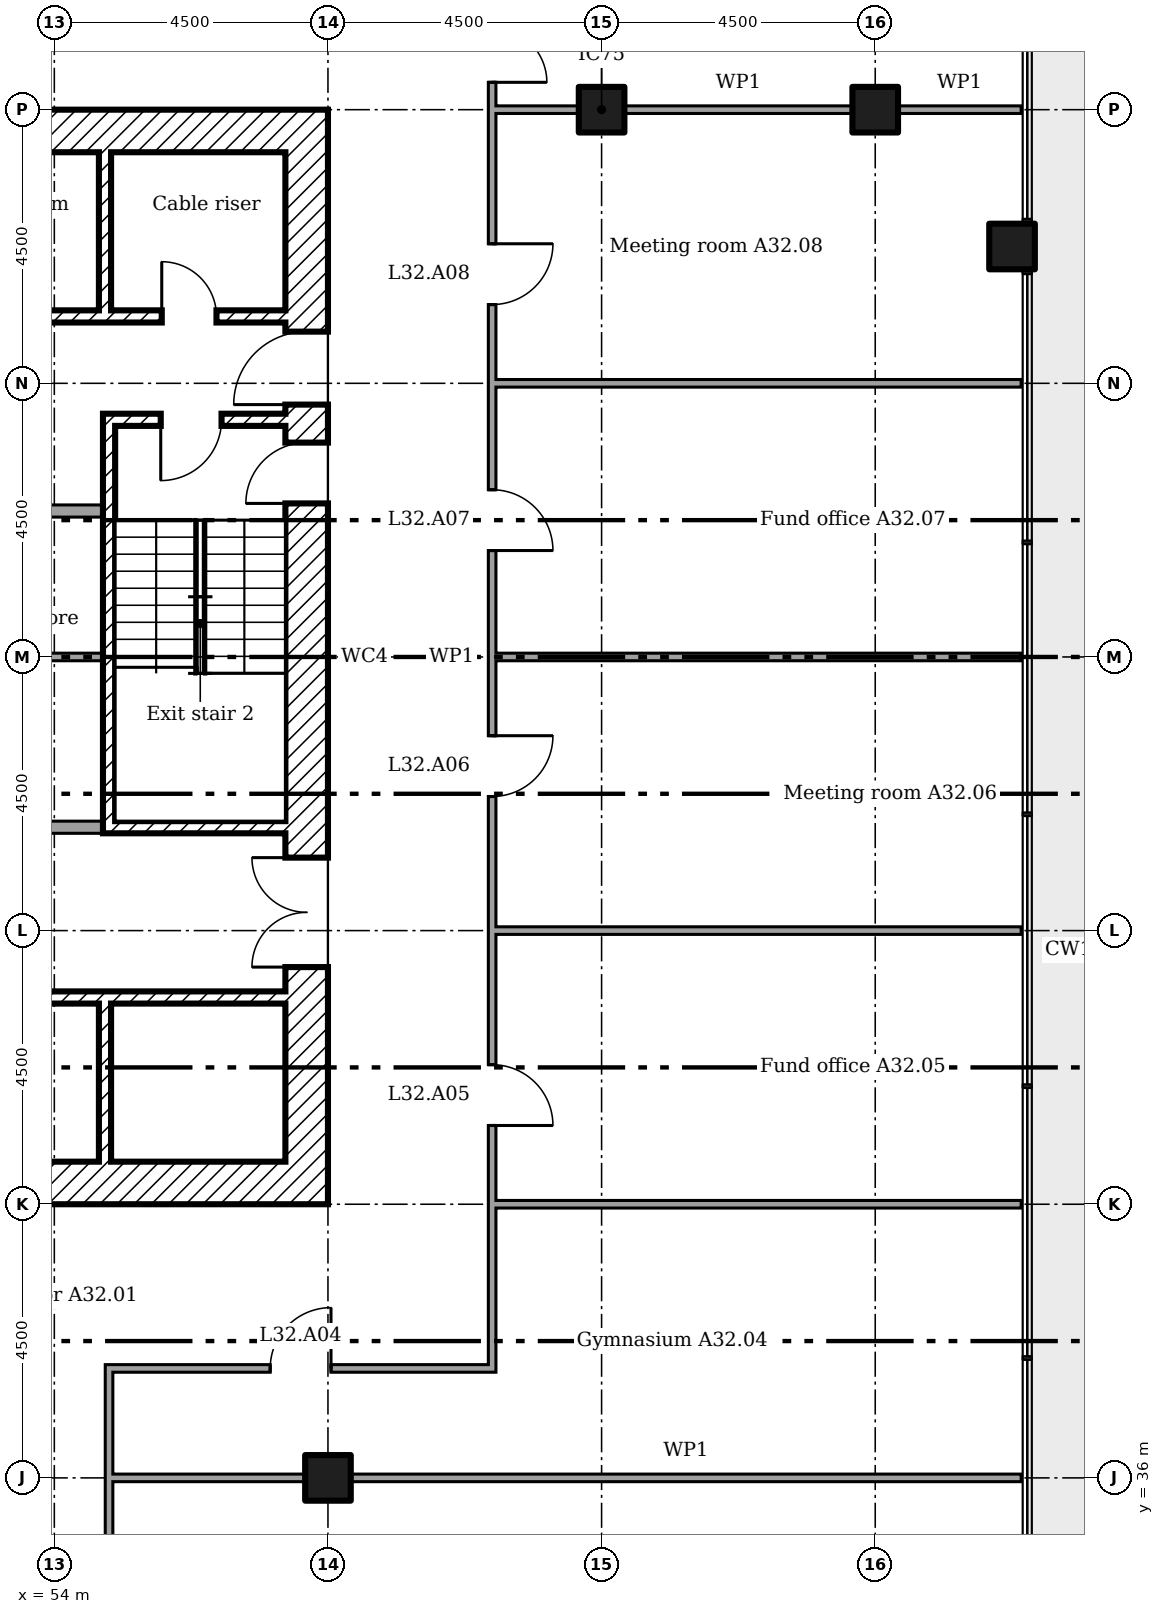
"""IFC4 building model, lengths in metres.
Left out: names, types, materials, properties, quantities, classifications, styles, units other than length and angle.
Written with IfcOpenShell. Run it as: python <this file> out.ifc"""

import sys

from ifc_helpers import new_model, si_unit, direction, frame, frame_2d, origin, origin_2d, place, context, subcontext, project, spatial, rectangle, extrude, element, fill, save


model = new_model("IFC4")
c1 = context("Model", 3, precision=1e-05, world=origin(), true_north=direction((0.0, 1.0)))
c2 = subcontext(c1, "Body", "Model", "MODEL_VIEW")
j1 = project(units=[si_unit("LENGTHUNIT", "METRE"), si_unit("PLANEANGLEUNIT", "RADIAN")], contexts=[c1])
p1 = place(None, origin())
s1 = spatial("IfcSite", under=j1, at=p1, CompositionType="ELEMENT")
p2 = place(p1, origin())
s2 = spatial("IfcBuilding", under=s1, at=p2, CompositionType="ELEMENT")
p3 = place(p2, frame((0.0, 0.0, 131.6)))
s3 = spatial("IfcBuildingStorey", under=s2, at=p3, CompositionType="ELEMENT", Elevation=131.6)
for number, where in (
    (1, (58.5, 36.0, 0.0)),
    (2, (63.0, 58.5, 0.0)),
    (3, (67.5, 58.5, 0.0)),
    (4, (69.75, 56.25, 0.0)),
):
    element("IfcColumn", number, at=place(p3, frame(where)), inside=s3, PredefinedType="COLUMN", context=c2, shape_type="SweptSolid", body=[
        extrude(rectangle(XDim=0.75, YDim=0.75, at=origin_2d()), origin(), (0.0, 0.0, 1.0), 3.6),
    ])
p4 = place(p3, frame((58.15, 40.5, 0.0), z_axis=(0.0, 0.0, 1.0), x_axis=(0.0, 1.0, 0.0)))
e5 = element("IfcWall", 5, at=p4, inside=s3, PredefinedType="SHEAR", context=c2, shape_type="SweptSolid", body=[
    extrude(rectangle(XDim=18.0, YDim=0.7, at=frame_2d((9.0, 0.0))), origin(), (0.0, 0.0, 1.0), 3.35),
])
p5 = place(p4, frame((13.15, 0.0, 0.0)))
e6 = element("IfcOpeningElement", 6, at=p5, cuts=e5, PredefinedType="OPENING", context=c2, shape_type="SweptSolid", body=[
    extrude(rectangle(XDim=1.2, YDim=2.1, at=frame_2d((0.6, 1.05))), frame((0.0, 0.36, 0.0), z_axis=(0.0, -1.0, 0.0), x_axis=(1.0, 0.0, 0.0)), (0.0, 0.0, 1.0), 0.72),
])
p6 = place(p4, frame((3.9, 0.0, 0.0)))
e7 = element("IfcOpeningElement", 7, at=p6, cuts=e5, PredefinedType="OPENING", context=c2, shape_type="SweptSolid", body=[
    extrude(rectangle(XDim=1.8, YDim=2.1, at=frame_2d((0.9, 1.05))), frame((0.0, 0.36, 0.0), z_axis=(0.0, -1.0, 0.0), x_axis=(1.0, 0.0, 0.0)), (0.0, 0.0, 1.0), 0.72),
])
p7 = place(p4, frame((11.525, 0.0, 0.0)))
e8 = element("IfcOpeningElement", 8, at=p7, cuts=e5, PredefinedType="OPENING", context=c2, shape_type="SweptSolid", body=[
    extrude(rectangle(XDim=1.0, YDim=2.1, at=frame_2d((0.5, 1.05))), frame((0.0, 0.36, 0.0), z_axis=(0.0, -1.0, 0.0), x_axis=(1.0, 0.0, 0.0)), (0.0, 0.0, 1.0), 0.72),
])
for number, where in (
    (9, (41.2, 58.15, 0.0)),
    (10, (41.2, 40.85, 0.0)),
):
    element("IfcWall", number, at=place(p3, frame(where)), inside=s3, PredefinedType="SHEAR", context=c2, shape_type="SweptSolid", body=[
        extrude(rectangle(XDim=16.6, YDim=0.7, at=frame_2d((8.3, 0.0))), origin(), (0.0, 0.0, 1.0), 3.35),
    ])
for number, where, z_axis, x_axis in (
    (11, (54.833, 57.8, 0.0), (0.0, 0.0, 1.0), (0.0, -1.0, 0.0)),
    (12, (54.833, 41.2, 0.0), (0.0, 0.0, 1.0), (0.0, 1.0, 0.0)),
):
    element("IfcWall", number, at=place(p3, frame(where, z_axis=z_axis, x_axis=x_axis)), inside=s3, PredefinedType="SHEAR", context=c2, shape_type="SweptSolid", body=[
        extrude(rectangle(XDim=2.6, YDim=0.2, at=frame_2d((1.3, 0.0))), origin(), (0.0, 0.0, 1.0), 3.35),
    ])
p8 = place(p3, frame((46.933, 55.1, 0.0)))
e13 = element("IfcWall", 13, at=p8, inside=s3, PredefinedType="SHEAR", context=c2, shape_type="SweptSolid", body=[
    extrude(rectangle(XDim=10.867, YDim=0.2, at=frame_2d((5.433, 0.0))), origin(), (0.0, 0.0, 1.0), 3.35),
])
p9 = place(p8, frame((8.833, 0.0, 0.0)))
e14 = element("IfcOpeningElement", 14, at=p9, cuts=e13, PredefinedType="OPENING", context=c2, shape_type="SweptSolid", body=[
    extrude(rectangle(XDim=0.9, YDim=2.1, at=frame_2d((0.45, 1.05))), frame((0.0, 0.11, 0.0), z_axis=(0.0, -1.0, 0.0), x_axis=(1.0, 0.0, 0.0)), (0.0, 0.0, 1.0), 0.22),
])
p10 = place(p8, frame((0.783, 0.0, 0.0)))
e15 = element("IfcOpeningElement", 15, at=p10, cuts=e13, PredefinedType="OPENING", context=c2, shape_type="SweptSolid", body=[
    extrude(rectangle(XDim=0.9, YDim=2.1, at=frame_2d((0.45, 1.05))), frame((0.0, 0.11, 0.0), z_axis=(0.0, -1.0, 0.0), x_axis=(1.0, 0.0, 0.0)), (0.0, 0.0, 1.0), 0.22),
])
p11 = place(p8, frame((4.783, 0.0, 0.0)))
e16 = element("IfcOpeningElement", 16, at=p11, cuts=e13, PredefinedType="OPENING", context=c2, shape_type="SweptSolid", body=[
    extrude(rectangle(XDim=0.9, YDim=2.1, at=frame_2d((0.45, 1.05))), frame((0.0, 0.11, 0.0), z_axis=(0.0, -1.0, 0.0), x_axis=(1.0, 0.0, 0.0)), (0.0, 0.0, 1.0), 0.22),
])
p12 = place(p3, frame((41.2, 43.9, 0.0)))
e17 = element("IfcWall", 17, at=p12, inside=s3, PredefinedType="SHEAR", context=c2, shape_type="SweptSolid", body=[
    extrude(rectangle(XDim=16.6, YDim=0.2, at=frame_2d((8.3, 0.0))), origin(), (0.0, 0.0, 1.0), 3.35),
])
p13 = place(p12, frame((1.033, 0.0, 0.0)))
e18 = element("IfcOpeningElement", 18, at=p13, cuts=e17, PredefinedType="OPENING", context=c2, shape_type="SweptSolid", body=[
    extrude(rectangle(XDim=1.2, YDim=2.1, at=frame_2d((0.6, 1.05))), frame((0.0, 0.11, 0.0), z_axis=(0.0, -1.0, 0.0), x_axis=(1.0, 0.0, 0.0)), (0.0, 0.0, 1.0), 0.22),
])
p14 = place(p12, frame((3.7, 0.0, 0.0)))
e19 = element("IfcOpeningElement", 19, at=p14, cuts=e17, PredefinedType="OPENING", context=c2, shape_type="SweptSolid", body=[
    extrude(rectangle(XDim=1.2, YDim=2.1, at=frame_2d((0.6, 1.05))), frame((0.0, 0.11, 0.0), z_axis=(0.0, -1.0, 0.0), x_axis=(1.0, 0.0, 0.0)), (0.0, 0.0, 1.0), 0.22),
])
p15 = place(p12, frame((6.367, 0.0, 0.0)))
e20 = element("IfcOpeningElement", 20, at=p15, cuts=e17, PredefinedType="OPENING", context=c2, shape_type="SweptSolid", body=[
    extrude(rectangle(XDim=1.2, YDim=2.1, at=frame_2d((0.6, 1.05))), frame((0.0, 0.11, 0.0), z_axis=(0.0, -1.0, 0.0), x_axis=(1.0, 0.0, 0.0)), (0.0, 0.0, 1.0), 0.22),
])
p16 = place(p12, frame((9.033, 0.0, 0.0)))
e21 = element("IfcOpeningElement", 21, at=p16, cuts=e17, PredefinedType="OPENING", context=c2, shape_type="SweptSolid", body=[
    extrude(rectangle(XDim=1.2, YDim=2.1, at=frame_2d((0.6, 1.05))), frame((0.0, 0.11, 0.0), z_axis=(0.0, -1.0, 0.0), x_axis=(1.0, 0.0, 0.0)), (0.0, 0.0, 1.0), 0.22),
])
p17 = place(p3, frame((54.8, 53.4, 0.0)))
e22 = element("IfcWall", 22, at=p17, inside=s3, PredefinedType="SHEAR", context=c2, shape_type="SweptSolid", body=[
    extrude(rectangle(XDim=3.0, YDim=0.2, at=frame_2d((1.5, 0.0))), origin(), (0.0, 0.0, 1.0), 3.35),
])
p18 = place(p17, frame((0.95, 0.0, 0.0)))
e23 = element("IfcOpeningElement", 23, at=p18, cuts=e22, PredefinedType="OPENING", context=c2, shape_type="SweptSolid", body=[
    extrude(rectangle(XDim=1.0, YDim=2.1, at=frame_2d((0.5, 1.05))), frame((0.0, 0.11, 0.0), z_axis=(0.0, -1.0, 0.0), x_axis=(1.0, 0.0, 0.0)), (0.0, 0.0, 1.0), 0.22),
])
p19 = place(p3, frame((54.8, 46.7, 0.0)))
e24 = element("IfcWall", 24, at=p19, inside=s3, PredefinedType="SHEAR", context=c2, shape_type="SweptSolid", body=[
    extrude(rectangle(XDim=3.0, YDim=0.2, at=frame_2d((1.5, 0.0))), origin(), (0.0, 0.0, 1.0), 3.35),
])
p20 = place(p3, frame((54.9, 46.8, 0.0), z_axis=(0.0, 0.0, 1.0), x_axis=(0.0, 1.0, 0.0)))
e25 = element("IfcWall", 25, at=p20, inside=s3, PredefinedType="SHEAR", context=c2, shape_type="SweptSolid", body=[
    extrude(rectangle(XDim=6.5, YDim=0.2, at=frame_2d((3.25, 0.0))), origin(), (0.0, 0.0, 1.0), 3.35),
])
p21 = place(p3, frame((44.2, 51.9, 0.0)))
e26 = element("IfcWall", 26, at=p21, inside=s3, PredefinedType="PARTITIONING", context=c2, shape_type="SweptSolid", body=[
    extrude(rectangle(XDim=10.6, YDim=0.2, at=frame_2d((5.3, 0.0))), origin(), (0.0, 0.0, 1.0), 3.35),
])
p22 = place(p21, frame((8.5, 0.0, 0.0)))
e27 = element("IfcOpeningElement", 27, at=p22, cuts=e26, PredefinedType="OPENING", context=c2, shape_type="SweptSolid", body=[
    extrude(rectangle(XDim=0.9, YDim=2.1, at=frame_2d((0.45, 1.05))), frame((0.0, 0.11, 0.0), z_axis=(0.0, -1.0, 0.0), x_axis=(1.0, 0.0, 0.0)), (0.0, 0.0, 1.0), 0.22),
])
p23 = place(p3, frame((44.2, 46.7, 0.0)))
e28 = element("IfcWall", 28, at=p23, inside=s3, PredefinedType="PARTITIONING", context=c2, shape_type="SweptSolid", body=[
    extrude(rectangle(XDim=10.6, YDim=0.2, at=frame_2d((5.3, 0.0))), origin(), (0.0, 0.0, 1.0), 3.35),
])
p24 = place(p23, frame((2.0, 0.0, 0.0)))
e29 = element("IfcOpeningElement", 29, at=p24, cuts=e28, PredefinedType="OPENING", context=c2, shape_type="SweptSolid", body=[
    extrude(rectangle(XDim=0.9, YDim=2.1, at=frame_2d((0.45, 1.05))), frame((0.0, 0.11, 0.0), z_axis=(0.0, -1.0, 0.0), x_axis=(1.0, 0.0, 0.0)), (0.0, 0.0, 1.0), 0.22),
])
p25 = place(p23, frame((5.65, 0.0, 0.0)))
e30 = element("IfcOpeningElement", 30, at=p25, cuts=e28, PredefinedType="OPENING", context=c2, shape_type="SweptSolid", body=[
    extrude(rectangle(XDim=0.9, YDim=2.1, at=frame_2d((0.45, 1.05))), frame((0.0, 0.11, 0.0), z_axis=(0.0, -1.0, 0.0), x_axis=(1.0, 0.0, 0.0)), (0.0, 0.0, 1.0), 0.22),
])
p26 = place(p23, frame((8.5, 0.0, 0.0)))
e31 = element("IfcOpeningElement", 31, at=p26, cuts=e28, PredefinedType="OPENING", context=c2, shape_type="SweptSolid", body=[
    extrude(rectangle(XDim=0.9, YDim=2.1, at=frame_2d((0.45, 1.05))), frame((0.0, 0.11, 0.0), z_axis=(0.0, -1.0, 0.0), x_axis=(1.0, 0.0, 0.0)), (0.0, 0.0, 1.0), 0.22),
])
p27 = place(p3, frame((51.562, 49.5, 0.0)))
e32 = element("IfcWall", 32, at=p27, inside=s3, PredefinedType="PARTITIONING", context=c2, shape_type="SweptSolid", body=[
    extrude(rectangle(XDim=3.238, YDim=0.125, at=frame_2d((1.619, 0.0))), origin(), (0.0, 0.0, 1.0), 3.35),
])
p28 = place(p3, frame((54.9, 36.0, 0.0)))
e33 = element("IfcWall", 33, at=p28, inside=s3, PredefinedType="PARTITIONING", context=c2, shape_type="SweptSolid", body=[
    extrude(rectangle(XDim=3.225, YDim=0.125, at=frame_2d((1.613, 0.0))), origin(), (0.0, 0.0, 1.0), 3.45),
])
p29 = place(p3, frame((58.875, 36.0, 0.0)))
e34 = element("IfcWall", 34, at=p29, inside=s3, PredefinedType="PARTITIONING", context=c2, shape_type="SweptSolid", body=[
    extrude(rectangle(XDim=11.025, YDim=0.125, at=frame_2d((5.512, 0.0))), origin(), (0.0, 0.0, 1.0), 2.766),
])
p30 = place(p3, frame((54.837, 37.8, 0.0)))
e35 = element("IfcWall", 35, at=p30, inside=s3, PredefinedType="PARTITIONING", context=c2, shape_type="SweptSolid", body=[
    extrude(rectangle(XDim=6.425, YDim=0.125, at=frame_2d((3.212, 0.0))), origin(), (0.0, 0.0, 1.0), 3.45),
])
p31 = place(p30, frame((2.712, 0.0, 0.0)))
e36 = element("IfcOpeningElement", 36, at=p31, cuts=e35, PredefinedType="OPENING", context=c2, shape_type="SweptSolid", body=[
    extrude(rectangle(XDim=1.0, YDim=2.1, at=frame_2d((0.5, 1.05))), frame((0.0, 0.073, 0.0), z_axis=(0.0, -1.0, 0.0), x_axis=(1.0, 0.0, 0.0)), (0.0, 0.0, 1.0), 0.145),
])
for number, where in (
    (37, (61.2, 40.5, 0.0)),
    (38, (61.2, 45.0, 0.0)),
    (39, (61.2, 49.5, 0.0)),
    (40, (61.2, 54.0, 0.0)),
):
    element("IfcWall", number, at=place(p3, frame(where)), inside=s3, PredefinedType="PARTITIONING", context=c2, shape_type="SweptSolid", body=[
        extrude(rectangle(XDim=8.7, YDim=0.125, at=frame_2d((4.35, 0.0))), origin(), (0.0, 0.0, 1.0), 2.766),
    ])
p32 = place(p3, frame((61.2, 58.5, 0.0)))
e41 = element("IfcWall", 41, at=p32, inside=s3, PredefinedType="PARTITIONING", context=c2, shape_type="SweptSolid", body=[
    extrude(rectangle(XDim=1.425, YDim=0.125, at=frame_2d((0.712, 0.0))), origin(), (0.0, 0.0, 1.0), 2.676),
])
p33 = place(p3, frame((63.375, 58.5, 0.0)))
e42 = element("IfcWall", 42, at=p33, inside=s3, PredefinedType="PARTITIONING", context=c2, shape_type="SweptSolid", body=[
    extrude(rectangle(XDim=3.75, YDim=0.125, at=frame_2d((1.875, 0.0))), origin(), (0.0, 0.0, 1.0), 2.676),
])
p34 = place(p3, frame((67.875, 58.5, 0.0)))
e43 = element("IfcWall", 43, at=p34, inside=s3, PredefinedType="PARTITIONING", context=c2, shape_type="SweptSolid", body=[
    extrude(rectangle(XDim=2.025, YDim=0.125, at=frame_2d((1.012, 0.0))), origin(), (0.0, 0.0, 1.0), 2.676),
])
p35 = place(p3, frame((54.9, 29.1, 0.0), z_axis=(0.0, 0.0, 1.0), x_axis=(0.0, 1.0, 0.0)))
e44 = element("IfcWall", 44, at=p35, inside=s3, PredefinedType="PARTITIONING", context=c2, shape_type="SweptSolid", body=[
    extrude(rectangle(XDim=8.637, YDim=0.125, at=frame_2d((4.319, 0.0))), origin(), (0.0, 0.0, 1.0), 3.45),
])
p36 = place(p35, frame((3.825, 0.0, 0.0)))
e45 = element("IfcOpeningElement", 45, at=p36, cuts=e44, PredefinedType="OPENING", context=c2, shape_type="SweptSolid", body=[
    extrude(rectangle(XDim=1.0, YDim=2.1, at=frame_2d((0.5, 1.05))), frame((0.0, 0.073, 0.0), z_axis=(0.0, -1.0, 0.0), x_axis=(1.0, 0.0, 0.0)), (0.0, 0.0, 1.0), 0.145),
])
p37 = place(p3, frame((61.2, 37.863, 0.0), z_axis=(0.0, 0.0, 1.0), x_axis=(0.0, 1.0, 0.0)))
e46 = element("IfcWall", 46, at=p37, inside=s3, PredefinedType="PARTITIONING", context=c2, shape_type="SweptSolid", body=[
    extrude(rectangle(XDim=23.275, YDim=0.125, at=frame_2d((11.637, 0.0))), origin(), (0.0, 0.0, 1.0), 3.45),
])
p38 = place(p37, frame((3.933, 0.0, 0.0)))
e47 = element("IfcOpeningElement", 47, at=p38, cuts=e46, PredefinedType="OPENING", context=c2, shape_type="SweptSolid", body=[
    extrude(rectangle(XDim=1.0, YDim=2.1, at=frame_2d((0.5, 1.05))), frame((0.0, 0.073, 0.0), z_axis=(0.0, -1.0, 0.0), x_axis=(1.0, 0.0, 0.0)), (0.0, 0.0, 1.0), 0.145),
])
p39 = place(p37, frame((9.343, 0.0, 0.0)))
e48 = element("IfcOpeningElement", 48, at=p39, cuts=e46, PredefinedType="OPENING", context=c2, shape_type="SweptSolid", body=[
    extrude(rectangle(XDim=1.0, YDim=2.1, at=frame_2d((0.5, 1.05))), frame((0.0, 0.073, 0.0), z_axis=(0.0, -1.0, 0.0), x_axis=(1.0, 0.0, 0.0)), (0.0, 0.0, 1.0), 0.145),
])
p40 = place(p37, frame((13.387, 0.0, 0.0)))
e49 = element("IfcOpeningElement", 49, at=p40, cuts=e46, PredefinedType="OPENING", context=c2, shape_type="SweptSolid", body=[
    extrude(rectangle(XDim=1.0, YDim=2.1, at=frame_2d((0.5, 1.05))), frame((0.0, 0.073, 0.0), z_axis=(0.0, -1.0, 0.0), x_axis=(1.0, 0.0, 0.0)), (0.0, 0.0, 1.0), 0.145),
])
p41 = place(p37, frame((17.433, 0.0, 0.0)))
e50 = element("IfcOpeningElement", 50, at=p41, cuts=e46, PredefinedType="OPENING", context=c2, shape_type="SweptSolid", body=[
    extrude(rectangle(XDim=1.0, YDim=2.1, at=frame_2d((0.5, 1.05))), frame((0.0, 0.073, 0.0), z_axis=(0.0, -1.0, 0.0), x_axis=(1.0, 0.0, 0.0)), (0.0, 0.0, 1.0), 0.145),
])
p42 = place(p37, frame((21.087, 0.0, 0.0)))
e51 = element("IfcOpeningElement", 51, at=p42, cuts=e46, PredefinedType="OPENING", context=c2, shape_type="SweptSolid", body=[
    extrude(rectangle(XDim=1.8, YDim=2.1, at=frame_2d((0.9, 1.05))), frame((0.0, 0.073, 0.0), z_axis=(0.0, -1.0, 0.0), x_axis=(1.0, 0.0, 0.0)), (0.0, 0.0, 1.0), 0.145),
])
p43 = place(p5, origin())
e52 = element("IfcDoor", 52, at=p43, inside=s3, OperationType="SINGLE_SWING_RIGHT", PredefinedType="DOOR", context=c2, shape_type="SweptSolid", body=[
    extrude(rectangle(XDim=1.2, YDim=2.1, at=frame_2d((0.6, 1.05))), frame((0.0, 0.025, 0.0), z_axis=(0.0, -1.0, 0.0), x_axis=(1.0, 0.0, 0.0)), (0.0, 0.0, 1.0), 0.05),
])
fill(e6, e52)
p44 = place(p6, origin())
e53 = element("IfcDoor", 53, at=p44, inside=s3, OperationType="DOUBLE_DOOR_SINGLE_SWING", PredefinedType="DOOR", context=c2, shape_type="SweptSolid", body=[
    extrude(rectangle(XDim=1.8, YDim=2.1, at=frame_2d((0.9, 1.05))), frame((0.0, 0.025, 0.0), z_axis=(0.0, -1.0, 0.0), x_axis=(1.0, 0.0, 0.0)), (0.0, 0.0, 1.0), 0.05),
])
fill(e7, e53)
p45 = place(p18, frame((1.0, 0.0, 0.0), x_axis=(-1.0, 0.0, 0.0)))
e54 = element("IfcDoor", 54, at=p45, inside=s3, OperationType="SINGLE_SWING_LEFT", PredefinedType="DOOR", context=c2, shape_type="SweptSolid", body=[
    extrude(rectangle(XDim=1.0, YDim=2.1, at=frame_2d((0.5, 1.05))), frame((0.0, 0.025, 0.0), z_axis=(0.0, -1.0, 0.0), x_axis=(1.0, 0.0, 0.0)), (0.0, 0.0, 1.0), 0.05),
])
fill(e23, e54)
p46 = place(p7, origin())
e55 = element("IfcDoor", 55, at=p46, inside=s3, OperationType="SINGLE_SWING_RIGHT", PredefinedType="DOOR", context=c2, shape_type="SweptSolid", body=[
    extrude(rectangle(XDim=1.0, YDim=2.1, at=frame_2d((0.5, 1.05))), frame((0.0, 0.025, 0.0), z_axis=(0.0, -1.0, 0.0), x_axis=(1.0, 0.0, 0.0)), (0.0, 0.0, 1.0), 0.05),
])
fill(e8, e55)
p47 = place(p9, origin())
e56 = element("IfcDoor", 56, at=p47, inside=s3, OperationType="SINGLE_SWING_RIGHT", PredefinedType="DOOR", context=c2, shape_type="SweptSolid", body=[
    extrude(rectangle(XDim=0.9, YDim=2.1, at=frame_2d((0.45, 1.05))), frame((0.0, 0.025, 0.0), z_axis=(0.0, -1.0, 0.0), x_axis=(1.0, 0.0, 0.0)), (0.0, 0.0, 1.0), 0.05),
])
fill(e14, e56)
p48 = place(p31, origin())
e57 = element("IfcDoor", 57, at=p48, inside=s3, OperationType="SINGLE_SWING_LEFT", PredefinedType="DOOR", context=c2, shape_type="SweptSolid", body=[
    extrude(rectangle(XDim=1.0, YDim=2.1, at=frame_2d((0.5, 1.05))), frame((0.0, 0.025, 0.0), z_axis=(0.0, -1.0, 0.0), x_axis=(1.0, 0.0, 0.0)), (0.0, 0.0, 1.0), 0.05),
])
fill(e36, e57)
p49 = place(p38, frame((1.0, 0.0, 0.0), x_axis=(-1.0, 0.0, 0.0)))
e58 = element("IfcDoor", 58, at=p49, inside=s3, OperationType="SINGLE_SWING_LEFT", PredefinedType="DOOR", context=c2, shape_type="SweptSolid", body=[
    extrude(rectangle(XDim=1.0, YDim=2.1, at=frame_2d((0.5, 1.05))), frame((0.0, 0.025, 0.0), z_axis=(0.0, -1.0, 0.0), x_axis=(1.0, 0.0, 0.0)), (0.0, 0.0, 1.0), 0.05),
])
fill(e47, e58)
p50 = place(p39, frame((1.0, 0.0, 0.0), x_axis=(-1.0, 0.0, 0.0)))
e59 = element("IfcDoor", 59, at=p50, inside=s3, OperationType="SINGLE_SWING_RIGHT", PredefinedType="DOOR", context=c2, shape_type="SweptSolid", body=[
    extrude(rectangle(XDim=1.0, YDim=2.1, at=frame_2d((0.5, 1.05))), frame((0.0, 0.025, 0.0), z_axis=(0.0, -1.0, 0.0), x_axis=(1.0, 0.0, 0.0)), (0.0, 0.0, 1.0), 0.05),
])
fill(e48, e59)
p51 = place(p40, frame((1.0, 0.0, 0.0), x_axis=(-1.0, 0.0, 0.0)))
e60 = element("IfcDoor", 60, at=p51, inside=s3, OperationType="SINGLE_SWING_LEFT", PredefinedType="DOOR", context=c2, shape_type="SweptSolid", body=[
    extrude(rectangle(XDim=1.0, YDim=2.1, at=frame_2d((0.5, 1.05))), frame((0.0, 0.025, 0.0), z_axis=(0.0, -1.0, 0.0), x_axis=(1.0, 0.0, 0.0)), (0.0, 0.0, 1.0), 0.05),
])
fill(e49, e60)
p52 = place(p41, frame((1.0, 0.0, 0.0), x_axis=(-1.0, 0.0, 0.0)))
e61 = element("IfcDoor", 61, at=p52, inside=s3, OperationType="SINGLE_SWING_RIGHT", PredefinedType="DOOR", context=c2, shape_type="SweptSolid", body=[
    extrude(rectangle(XDim=1.0, YDim=2.1, at=frame_2d((0.5, 1.05))), frame((0.0, 0.025, 0.0), z_axis=(0.0, -1.0, 0.0), x_axis=(1.0, 0.0, 0.0)), (0.0, 0.0, 1.0), 0.05),
])
fill(e50, e61)
p53 = place(p42, frame((1.8, 0.0, 0.0), x_axis=(-1.0, 0.0, 0.0)))
e62 = element("IfcDoor", 62, at=p53, inside=s3, OperationType="DOUBLE_DOOR_SINGLE_SWING", PredefinedType="DOOR", context=c2, shape_type="SweptSolid", body=[
    extrude(rectangle(XDim=1.8, YDim=2.1, at=frame_2d((0.9, 1.05))), frame((0.0, 0.025, 0.0), z_axis=(0.0, -1.0, 0.0), x_axis=(1.0, 0.0, 0.0)), (0.0, 0.0, 1.0), 0.05),
])
fill(e51, e62)
save(model, sys.argv[1])
